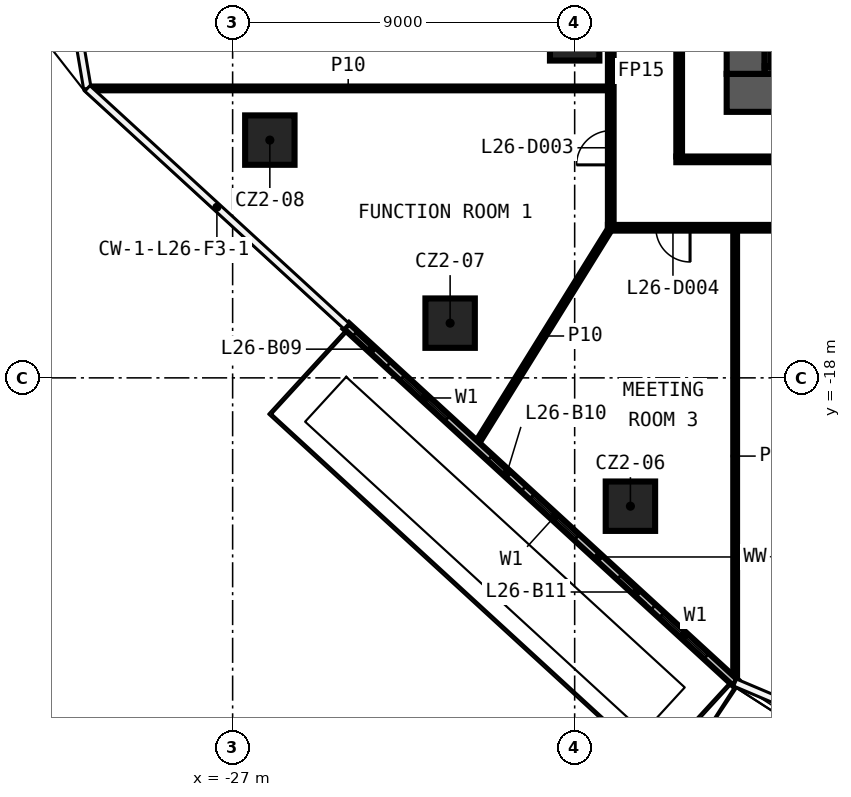
"""IFC4 building model, lengths in metres.
Left out: names, types, materials, properties, quantities, classifications, styles, units other than length and angle.
Written with IfcOpenShell. Run it as: python <this file> out.ifc"""

import sys

from ifc_helpers import new_model, si_unit, direction, frame, frame_2d, origin, origin_2d, place, context, subcontext, project, spatial, rectangle, extrude, element, fill, save


model = new_model("IFC4")
c1 = context("Model", 3, precision=1e-05, world=origin(), true_north=direction((0.0, 1.0)))
c2 = subcontext(c1, "Body", "Model", "MODEL_VIEW")
j1 = project(units=[si_unit("LENGTHUNIT", "METRE"), si_unit("PLANEANGLEUNIT", "RADIAN")], contexts=[c1])
p1 = place(None, origin())
s1 = spatial("IfcSite", under=j1, at=p1, CompositionType="ELEMENT")
p2 = place(p1, origin())
s2 = spatial("IfcBuilding", under=s1, at=p2, CompositionType="ELEMENT")
p3 = place(p2, frame((0.0, 0.0, 121.1)))
s3 = spatial("IfcBuildingStorey", under=s2, at=p3, CompositionType="ELEMENT", Elevation=121.1)
for number, where, z_axis, x_axis in (
    (1, (-16.533, -21.377, 0.0), (0.0, 0.0, 1.0), (1.0, 0.0, 0.0)),
    (2, (-21.277, -16.56, 0.0), (0.0, 0.0, 1.0), (1.0, 0.0, 0.0)),
    (3, (-26.021, -11.743, 0.0), (0.0, 0.0, 1.0), (1.0, 0.0, 0.0)),
    (4, (-18.0, -9.0, 0.0), (0.0, 0.0, 1.0), (1.0, 0.0, 0.0)),
):
    element("IfcColumn", number, at=place(p3, frame(where, z_axis=z_axis, x_axis=x_axis)), inside=s3, PredefinedType="COLUMN", context=c2, shape_type="SweptSolid", body=[
        extrude(rectangle(XDim=1.3, YDim=1.3, at=origin_2d()), origin(), (0.0, 0.0, 1.0), 3.3),
    ])
p4 = place(p3, frame((17.125, -14.05, 0.0), z_axis=(0.0, 0.0, 1.0), x_axis=(-1.0, 0.0, 0.0)))
e5 = element("IfcWall", 5, at=p4, inside=s3, PredefinedType="PARTITIONING", context=c2, shape_type="SweptSolid", body=[
    extrude(rectangle(XDim=34.25, YDim=0.15, at=frame_2d((17.125, 0.0))), origin(), (0.0, 0.0, 1.0), 3.3),
])
p5 = place(p4, frame((32.089, 0.0, 0.0)))
e6 = element("IfcOpeningElement", 6, at=p5, cuts=e5, PredefinedType="OPENING", context=c2, shape_type="SweptSolid", body=[
    extrude(rectangle(XDim=0.9, YDim=2.1, at=frame_2d((0.45, 1.05))), frame((0.0, 0.085, 0.0), z_axis=(0.0, -1.0, 0.0), x_axis=(1.0, 0.0, 0.0)), (0.0, 0.0, 1.0), 0.17),
])
p6 = place(p4, frame((25.666, 0.0, 0.0)))
e7 = element("IfcOpeningElement", 7, at=p6, cuts=e5, PredefinedType="OPENING", context=c2, shape_type="SweptSolid", body=[
    extrude(rectangle(XDim=1.0, YDim=2.1, at=frame_2d((0.5, 1.05))), frame((0.0, 0.085, 0.0), z_axis=(0.0, -1.0, 0.0), x_axis=(1.0, 0.0, 0.0)), (0.0, 0.0, 1.0), 0.17),
])
p7 = place(p4, frame((18.714, 0.0, 0.0)))
e8 = element("IfcOpeningElement", 8, at=p7, cuts=e5, PredefinedType="OPENING", context=c2, shape_type="SweptSolid", body=[
    extrude(rectangle(XDim=1.0, YDim=2.1, at=frame_2d((0.5, 1.05))), frame((0.0, 0.085, 0.0), z_axis=(0.0, -1.0, 0.0), x_axis=(1.0, 0.0, 0.0)), (0.0, 0.0, 1.0), 0.17),
])
p8 = place(p4, frame((16.558, 0.0, 0.0)))
e9 = element("IfcOpeningElement", 9, at=p8, cuts=e5, PredefinedType="OPENING", context=c2, shape_type="SweptSolid", body=[
    extrude(rectangle(XDim=1.0, YDim=2.1, at=frame_2d((0.5, 1.05))), frame((0.0, 0.085, 0.0), z_axis=(0.0, -1.0, 0.0), x_axis=(1.0, 0.0, 0.0)), (0.0, 0.0, 1.0), 0.17),
])
p9 = place(p4, frame((9.602, 0.0, 0.0)))
e10 = element("IfcOpeningElement", 10, at=p9, cuts=e5, PredefinedType="OPENING", context=c2, shape_type="SweptSolid", body=[
    extrude(rectangle(XDim=1.0, YDim=2.1, at=frame_2d((0.5, 1.05))), frame((0.0, 0.085, 0.0), z_axis=(0.0, -1.0, 0.0), x_axis=(1.0, 0.0, 0.0)), (0.0, 0.0, 1.0), 0.17),
])
p10 = place(p4, frame((7.451, 0.0, 0.0)))
e11 = element("IfcOpeningElement", 11, at=p10, cuts=e5, PredefinedType="OPENING", context=c2, shape_type="SweptSolid", body=[
    extrude(rectangle(XDim=1.0, YDim=2.1, at=frame_2d((0.5, 1.05))), frame((0.0, 0.085, 0.0), z_axis=(0.0, -1.0, 0.0), x_axis=(1.0, 0.0, 0.0)), (0.0, 0.0, 1.0), 0.17),
])
p11 = place(p4, frame((0.576, 0.0, 0.0)))
e12 = element("IfcOpeningElement", 12, at=p11, cuts=e5, PredefinedType="OPENING", context=c2, shape_type="SweptSolid", body=[
    extrude(rectangle(XDim=1.0, YDim=2.1, at=frame_2d((0.5, 1.05))), frame((0.0, 0.085, 0.0), z_axis=(0.0, -1.0, 0.0), x_axis=(1.0, 0.0, 0.0)), (0.0, 0.0, 1.0), 0.17),
])
p12 = place(p3, frame((-15.325, -12.25, 0.0), z_axis=(0.0, 0.0, 1.0), x_axis=(1.0, 0.0, 0.0)))
e13 = element("IfcWall", 13, at=p12, inside=s3, PredefinedType="PARTITIONING", context=c2, shape_type="SweptSolid", body=[
    extrude(rectangle(XDim=22.6, YDim=0.15, at=frame_2d((11.3, 0.0))), origin(), (0.0, 0.0, 1.0), 3.3),
])
p13 = place(p3, frame((-30.793, -10.383, 0.0), z_axis=(0.0, 0.0, 1.0), x_axis=(1.0, 0.0, 0.0)))
e14 = element("IfcWall", 14, at=p13, inside=s3, PredefinedType="PARTITIONING", context=c2, shape_type="SweptSolid", body=[
    extrude(rectangle(XDim=13.668, YDim=0.1, at=frame_2d((6.834, 0.0))), origin(), (0.0, 0.0, 1.0), 3.3),
])
p14 = place(p3, frame((-20.585, -19.747, 0.0), z_axis=(0.0, 0.0, 1.0), x_axis=(0.527253174698, 0.849708238027, 0.0)))
e15 = element("IfcWall", 15, at=p14, inside=s3, PredefinedType="PARTITIONING", context=c2, shape_type="SweptSolid", body=[
    extrude(rectangle(XDim=6.704, YDim=0.1, at=frame_2d((3.352, 0.0))), origin(), (0.0, 0.0, 1.0), 3.3),
])
p15 = place(p3, frame((-13.777, -25.992, 0.0), z_axis=(0.0, 0.0, 1.0), x_axis=(0.0, 1.0, 0.0)))
e16 = element("IfcWall", 16, at=p15, inside=s3, PredefinedType="PARTITIONING", context=c2, shape_type="SweptSolid", body=[
    extrude(rectangle(XDim=11.867, YDim=0.1, at=frame_2d((5.933, 0.0))), origin(), (0.0, 0.0, 1.0), 3.3),
])
p16 = place(p3, frame((-15.25, 12.175, 0.0), z_axis=(0.0, 0.0, 1.0), x_axis=(0.0, -1.0, 0.0)))
e17 = element("IfcWall", 17, at=p16, inside=s3, PredefinedType="PARTITIONING", context=c2, shape_type="SweptSolid", body=[
    extrude(rectangle(XDim=24.35, YDim=0.15, at=frame_2d((12.175, 0.0))), origin(), (0.0, 0.0, 1.0), 3.3),
])
p17 = place(p16, frame((11.725, 0.0, 0.0)))
e18 = element("IfcOpeningElement", 18, at=p17, cuts=e17, PredefinedType="OPENING", context=c2, shape_type="SweptSolid", body=[
    extrude(rectangle(XDim=0.9, YDim=2.1, at=frame_2d((0.45, 1.05))), frame((0.0, 0.085, 0.0), z_axis=(0.0, -1.0, 0.0), x_axis=(1.0, 0.0, 0.0)), (0.0, 0.0, 1.0), 0.17),
])
p18 = place(p3, frame((-17.05, -13.975, 0.0), z_axis=(0.0, 0.0, 1.0), x_axis=(0.0, 1.0, 0.0)))
e19 = element("IfcWall", 19, at=p18, inside=s3, PredefinedType="PARTITIONING", context=c2, shape_type="SweptSolid", body=[
    extrude(rectangle(XDim=27.95, YDim=0.15, at=frame_2d((13.975, 0.0))), origin(), (0.0, 0.0, 1.0), 3.3),
])
p19 = place(p18, frame((11.186, 0.0, 0.0)))
e20 = element("IfcOpeningElement", 20, at=p19, cuts=e19, PredefinedType="OPENING", context=c2, shape_type="SweptSolid", body=[
    extrude(rectangle(XDim=0.9, YDim=2.1, at=frame_2d((0.45, 1.05))), frame((0.0, 0.085, 0.0), z_axis=(0.0, -1.0, 0.0), x_axis=(1.0, 0.0, 0.0)), (0.0, 0.0, 1.0), 0.17),
])
p20 = place(p18, frame((8.404, 0.0, 0.0)))
e21 = element("IfcOpeningElement", 21, at=p20, cuts=e19, PredefinedType="OPENING", context=c2, shape_type="SweptSolid", body=[
    extrude(rectangle(XDim=0.9, YDim=2.1, at=frame_2d((0.45, 1.05))), frame((0.0, 0.085, 0.0), z_axis=(0.0, -1.0, 0.0), x_axis=(1.0, 0.0, 0.0)), (0.0, 0.0, 1.0), 0.17),
])
p21 = place(p18, frame((1.58, 0.0, 0.0)))
e22 = element("IfcOpeningElement", 22, at=p21, cuts=e19, PredefinedType="OPENING", context=c2, shape_type="SweptSolid", body=[
    extrude(rectangle(XDim=0.9, YDim=2.1, at=frame_2d((0.45, 1.05))), frame((0.0, 0.085, 0.0), z_axis=(0.0, -1.0, 0.0), x_axis=(1.0, 0.0, 0.0)), (0.0, 0.0, 1.0), 0.17),
])
p22 = place(p18, frame((24.871, 0.0, 0.0)))
e23 = element("IfcOpeningElement", 23, at=p22, cuts=e19, PredefinedType="OPENING", context=c2, shape_type="SweptSolid", body=[
    extrude(rectangle(XDim=0.9, YDim=2.1, at=frame_2d((0.45, 1.05))), frame((0.0, 0.085, 0.0), z_axis=(0.0, -1.0, 0.0), x_axis=(1.0, 0.0, 0.0)), (0.0, 0.0, 1.0), 0.17),
])
p23 = place(p18, frame((20.159, 0.0, 0.0)))
e24 = element("IfcOpeningElement", 24, at=p23, cuts=e19, PredefinedType="OPENING", context=c2, shape_type="SweptSolid", body=[
    extrude(rectangle(XDim=0.9, YDim=2.1, at=frame_2d((0.45, 1.05))), frame((0.0, 0.085, 0.0), z_axis=(0.0, -1.0, 0.0), x_axis=(1.0, 0.0, 0.0)), (0.0, 0.0, 1.0), 0.17),
])
p24 = place(p18, frame((16.211, 0.0, 0.0)))
e25 = element("IfcOpeningElement", 25, at=p24, cuts=e19, PredefinedType="OPENING", context=c2, shape_type="SweptSolid", body=[
    extrude(rectangle(XDim=0.9, YDim=2.1, at=frame_2d((0.45, 1.05))), frame((0.0, 0.085, 0.0), z_axis=(0.0, -1.0, 0.0), x_axis=(1.0, 0.0, 0.0)), (0.0, 0.0, 1.0), 0.17),
])
p25 = place(p3, frame((-24.006, -16.636, 0.0), z_axis=(0.0, 0.0, 1.0), x_axis=(0.736923378069, -0.675976282761, 0.0)))
e26 = element("IfcWall", 26, at=p25, inside=s3, PredefinedType="SOLIDWALL", context=c2, shape_type="SweptSolid", body=[
    extrude(rectangle(XDim=13.88, YDim=0.2, at=frame_2d((6.94, 0.0))), origin(), (0.0, 0.0, 1.0), 3.3),
])
p26 = place(p25, frame((2.0, 0.0, 0.6)))
e27 = element("IfcOpeningElement", 27, at=p26, cuts=e26, PredefinedType="OPENING", context=c2, shape_type="SweptSolid", body=[
    extrude(rectangle(XDim=1.6, YDim=2.4, at=frame_2d((0.8, 1.2))), frame((0.0, 0.11, 0.0), z_axis=(0.0, -1.0, 0.0), x_axis=(1.0, 0.0, 0.0)), (0.0, 0.0, 1.0), 0.22),
])
p27 = place(p25, frame((0.3, 0.0, 0.0)))
e28 = element("IfcOpeningElement", 28, at=p27, cuts=e26, PredefinedType="OPENING", context=c2, shape_type="SweptSolid", body=[
    extrude(rectangle(XDim=1.2, YDim=2.4, at=frame_2d((0.6, 1.2))), frame((0.0, 0.11, 0.0), z_axis=(0.0, -1.0, 0.0), x_axis=(1.0, 0.0, 0.0)), (0.0, 0.0, 1.0), 0.22),
])
p28 = place(p25, frame((6.627, 0.0, 0.6)))
e29 = element("IfcOpeningElement", 29, at=p28, cuts=e26, PredefinedType="OPENING", context=c2, shape_type="SweptSolid", body=[
    extrude(rectangle(XDim=1.6, YDim=2.4, at=frame_2d((0.8, 1.2))), frame((0.0, 0.11, 0.0), z_axis=(0.0, -1.0, 0.0), x_axis=(1.0, 0.0, 0.0)), (0.0, 0.0, 1.0), 0.22),
])
p29 = place(p25, frame((5.127, 0.0, 0.0)))
e30 = element("IfcOpeningElement", 30, at=p29, cuts=e26, PredefinedType="OPENING", context=c2, shape_type="SweptSolid", body=[
    extrude(rectangle(XDim=1.2, YDim=2.4, at=frame_2d((0.6, 1.2))), frame((0.0, 0.11, 0.0), z_axis=(0.0, -1.0, 0.0), x_axis=(1.0, 0.0, 0.0)), (0.0, 0.0, 1.0), 0.22),
])
p30 = place(p25, frame((11.253, 0.0, 0.6)))
e31 = element("IfcOpeningElement", 31, at=p30, cuts=e26, PredefinedType="OPENING", context=c2, shape_type="SweptSolid", body=[
    extrude(rectangle(XDim=1.6, YDim=2.4, at=frame_2d((0.8, 1.2))), frame((0.0, 0.11, 0.0), z_axis=(0.0, -1.0, 0.0), x_axis=(1.0, 0.0, 0.0)), (0.0, 0.0, 1.0), 0.22),
])
p31 = place(p25, frame((9.753, 0.0, 0.0)))
e32 = element("IfcOpeningElement", 32, at=p31, cuts=e26, PredefinedType="OPENING", context=c2, shape_type="SweptSolid", body=[
    extrude(rectangle(XDim=1.2, YDim=2.4, at=frame_2d((0.6, 1.2))), frame((0.0, 0.11, 0.0), z_axis=(0.0, -1.0, 0.0), x_axis=(1.0, 0.0, 0.0)), (0.0, 0.0, 1.0), 0.22),
])
p32 = place(p3, frame((14.0, -10.5, 0.0), z_axis=(0.0, 0.0, 1.0), x_axis=(-1.0, 0.0, 0.0)))
e33 = element("IfcWall", 33, at=p32, inside=s3, PredefinedType="SHEAR", context=c2, shape_type="SweptSolid", body=[
    extrude(rectangle(XDim=28.0, YDim=1.0, at=frame_2d((14.0, 0.0))), origin(), (0.0, 0.0, 1.0), 3.3),
])
p33 = place(p32, frame((5.1, 0.0, 0.0)))
e34 = element("IfcOpeningElement", 34, at=p33, cuts=e33, PredefinedType="OPENING", context=c2, shape_type="SweptSolid", body=[
    extrude(rectangle(XDim=1.6, YDim=2.1, at=frame_2d((0.8, 1.05))), frame((0.0, 0.51, 0.0), z_axis=(0.0, -1.0, 0.0), x_axis=(1.0, 0.0, 0.0)), (0.0, 0.0, 1.0), 1.02),
])
p34 = place(p3, frame((-13.5, -10.0, 0.0), z_axis=(0.0, 0.0, 1.0), x_axis=(0.0, 1.0, 0.0)))
e35 = element("IfcWall", 35, at=p34, inside=s3, PredefinedType="SHEAR", context=c2, shape_type="SweptSolid", body=[
    extrude(rectangle(XDim=20.0, YDim=1.0, at=frame_2d((10.0, 0.0))), origin(), (0.0, 0.0, 1.0), 3.3),
])
p35 = place(p3, frame((6.9, -9.9, 0.0), z_axis=(0.0, 0.0, 1.0), x_axis=(-1.0, 0.0, 0.0)))
e36 = element("IfcWall", 36, at=p35, inside=s3, PredefinedType="SHEAR", context=c2, shape_type="SweptSolid", body=[
    extrude(rectangle(XDim=19.9, YDim=0.2, at=frame_2d((9.95, 0.0))), origin(), (0.0, 0.0, 1.0), 3.3),
])
p36 = place(p3, frame((-12.9, -9.8, 0.0), z_axis=(0.0, 0.0, 1.0), x_axis=(0.0, 1.0, 0.0)))
e37 = element("IfcWall", 37, at=p36, inside=s3, PredefinedType="SHEAR", context=c2, shape_type="SweptSolid", body=[
    extrude(rectangle(XDim=19.6, YDim=0.2, at=frame_2d((9.8, 0.0))), origin(), (0.0, 0.0, 1.0), 3.3),
])
p37 = place(p21, origin())
e38 = element("IfcDoor", 38, at=p37, inside=s3, OperationType="SINGLE_SWING_LEFT", PredefinedType="DOOR", context=c2, shape_type="SweptSolid", body=[
    extrude(rectangle(XDim=0.9, YDim=2.1, at=frame_2d((0.45, 1.05))), frame((0.0, 0.025, 0.0), z_axis=(0.0, -1.0, 0.0), x_axis=(1.0, 0.0, 0.0)), (0.0, 0.0, 1.0), 0.05),
])
fill(e22, e38)
p38 = place(p5, origin())
e39 = element("IfcDoor", 39, at=p38, inside=s3, OperationType="SINGLE_SWING_RIGHT", PredefinedType="DOOR", context=c2, shape_type="SweptSolid", body=[
    extrude(rectangle(XDim=0.9, YDim=2.1, at=frame_2d((0.45, 1.05))), frame((0.0, 0.025, 0.0), z_axis=(0.0, -1.0, 0.0), x_axis=(1.0, 0.0, 0.0)), (0.0, 0.0, 1.0), 0.05),
])
fill(e6, e39)
p39 = place(p26, origin())
e40 = element("IfcWindow", 40, at=p39, inside=s3, PartitioningType="SINGLE_PANEL", PredefinedType="WINDOW", context=c2, shape_type="SweptSolid", body=[
    extrude(rectangle(XDim=1.6, YDim=2.4, at=frame_2d((0.8, 1.2))), frame((0.0, 0.03, 0.0), z_axis=(0.0, -1.0, 0.0), x_axis=(1.0, 0.0, 0.0)), (0.0, 0.0, 1.0), 0.06),
])
fill(e27, e40)
p40 = place(p27, origin())
e41 = element("IfcDoor", 41, at=p40, inside=s3, OperationType="SLIDING_TO_LEFT", PredefinedType="DOOR", context=c2, shape_type="SweptSolid", body=[
    extrude(rectangle(XDim=1.2, YDim=2.4, at=frame_2d((0.6, 1.2))), frame((0.0, 0.025, 0.0), z_axis=(0.0, -1.0, 0.0), x_axis=(1.0, 0.0, 0.0)), (0.0, 0.0, 1.0), 0.05),
])
fill(e28, e41)
p41 = place(p28, origin())
e42 = element("IfcWindow", 42, at=p41, inside=s3, PartitioningType="SINGLE_PANEL", PredefinedType="WINDOW", context=c2, shape_type="SweptSolid", body=[
    extrude(rectangle(XDim=1.6, YDim=2.4, at=frame_2d((0.8, 1.2))), frame((0.0, 0.03, 0.0), z_axis=(0.0, -1.0, 0.0), x_axis=(1.0, 0.0, 0.0)), (0.0, 0.0, 1.0), 0.06),
])
fill(e29, e42)
p42 = place(p29, origin())
e43 = element("IfcDoor", 43, at=p42, inside=s3, OperationType="SLIDING_TO_LEFT", PredefinedType="DOOR", context=c2, shape_type="SweptSolid", body=[
    extrude(rectangle(XDim=1.2, YDim=2.4, at=frame_2d((0.6, 1.2))), frame((0.0, 0.025, 0.0), z_axis=(0.0, -1.0, 0.0), x_axis=(1.0, 0.0, 0.0)), (0.0, 0.0, 1.0), 0.05),
])
fill(e30, e43)
p43 = place(p30, origin())
e44 = element("IfcWindow", 44, at=p43, inside=s3, PartitioningType="SINGLE_PANEL", PredefinedType="WINDOW", context=c2, shape_type="SweptSolid", body=[
    extrude(rectangle(XDim=1.6, YDim=2.4, at=frame_2d((0.8, 1.2))), frame((0.0, 0.03, 0.0), z_axis=(0.0, -1.0, 0.0), x_axis=(1.0, 0.0, 0.0)), (0.0, 0.0, 1.0), 0.06),
])
fill(e31, e44)
p44 = place(p31, origin())
e45 = element("IfcDoor", 45, at=p44, inside=s3, OperationType="SLIDING_TO_LEFT", PredefinedType="DOOR", context=c2, shape_type="SweptSolid", body=[
    extrude(rectangle(XDim=1.2, YDim=2.4, at=frame_2d((0.6, 1.2))), frame((0.0, 0.025, 0.0), z_axis=(0.0, -1.0, 0.0), x_axis=(1.0, 0.0, 0.0)), (0.0, 0.0, 1.0), 0.05),
])
fill(e32, e45)
save(model, sys.argv[1])
